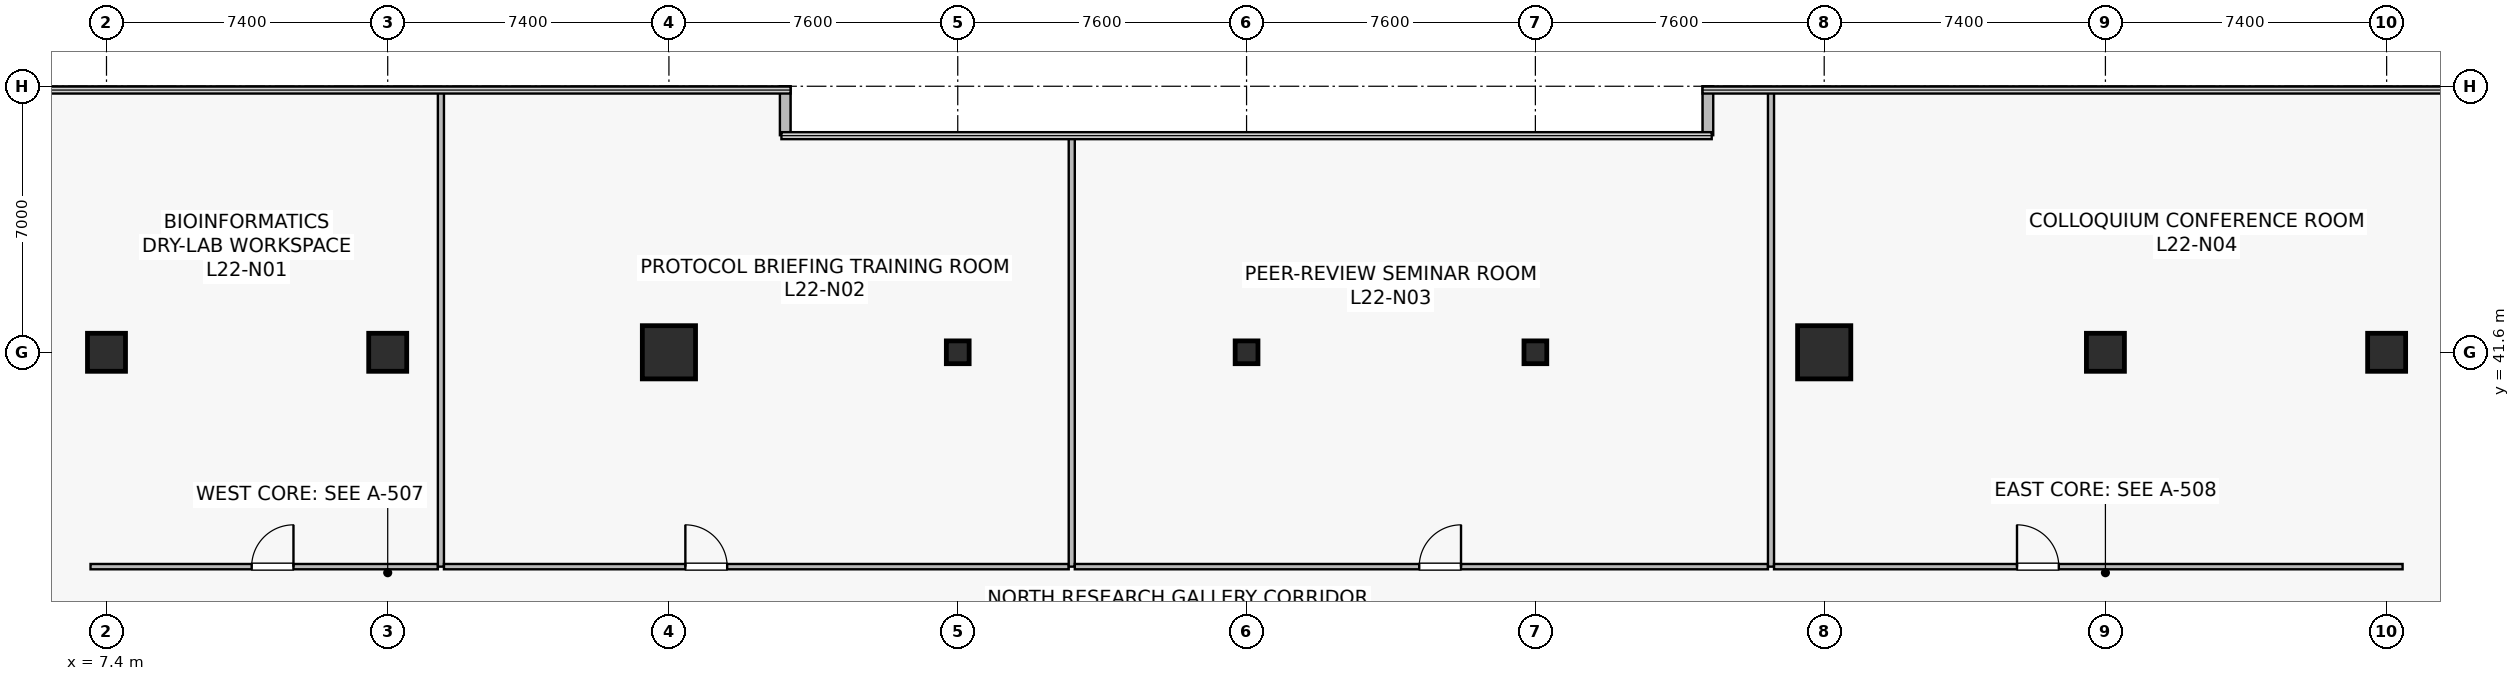
"""IFC4 building model, lengths in metres.
Left out: names, types, materials, properties, quantities, classifications, styles, units other than length and angle.
Written with IfcOpenShell. Run it as: python <this file> out.ifc"""

import sys

from ifc_helpers import new_model, si_unit, direction, frame, frame_2d, origin, origin_2d, place, context, subcontext, project, spatial, rectangle, hollow_rectangle, extrude, source, transform, mapped, element, fill, save


model = new_model("IFC4")
c1 = context("Model", 3, precision=1e-05, world=origin(), true_north=direction((0.0, 1.0)))
c2 = subcontext(c1, "Body", "Model", "MODEL_VIEW")
j1 = project(units=[si_unit("LENGTHUNIT", "METRE"), si_unit("PLANEANGLEUNIT", "RADIAN")], contexts=[c1])
p1 = place(None, origin())
s1 = spatial("IfcSite", under=j1, at=p1, CompositionType="ELEMENT")
p2 = place(p1, origin())
s2 = spatial("IfcBuilding", under=s1, at=p2, CompositionType="ELEMENT")
p3 = place(p2, frame((0.0, 0.0, 90.8)))
s3 = spatial("IfcBuildingStorey", under=s2, at=p3, CompositionType="ELEMENT", Elevation=90.8)
m1 = source(origin(), c2, "Body", "SweptSolid", [
    extrude(rectangle(XDim=1.0, YDim=1.0, at=origin_2d()), origin(), (0.0, 0.0, 1.0), 4.1),
])
p4 = place(p3, frame((14.8, 41.6, 0.0), z_axis=(0.0, 0.0, 1.0), x_axis=(1.0, 0.0, 0.0)))
e1 = element("IfcColumn", 1, at=p4, inside=s3, PredefinedType="COLUMN", context=c2, shape_type="MappedRepresentation", body=[
    mapped(m1, transform((0.0, 0.0, 0.0), scale=1.0)),
])
m2 = source(origin(), c2, "Body", "SweptSolid", [
    extrude(rectangle(XDim=1.4, YDim=1.4, at=origin_2d()), origin(), (0.0, 0.0, 1.0), 4.1),
])
for number, where, z_axis, x_axis in (
    (2, (22.2, 41.6, 0.0), (0.0, 0.0, 1.0), (1.0, 0.0, 0.0)),
    (3, (52.6, 41.6, 0.0), (0.0, 0.0, 1.0), (1.0, 0.0, 0.0)),
):
    element("IfcColumn", number, at=place(p3, frame(where, z_axis=z_axis, x_axis=x_axis)), inside=s3, PredefinedType="COLUMN", context=c2, shape_type="MappedRepresentation", body=[
        mapped(m2, transform((0.0, 0.0, 0.0), scale=1.0)),
    ])
for number, where, z_axis, x_axis in (
    (4, (60.0, 41.6, 0.0), (0.0, 0.0, 1.0), (1.0, 0.0, 0.0)),
    (5, (7.4, 41.6, 0.0), (0.0, 0.0, 1.0), (1.0, 0.0, 0.0)),
    (6, (67.4, 41.6, 0.0), (0.0, 0.0, 1.0), (1.0, 0.0, 0.0)),
):
    element("IfcColumn", number, at=place(p3, frame(where, z_axis=z_axis, x_axis=x_axis)), inside=s3, PredefinedType="COLUMN", context=c2, shape_type="MappedRepresentation", body=[
        mapped(m1, transform((0.0, 0.0, 0.0), scale=1.0)),
    ])
m3 = source(origin(), c2, "Body", "SweptSolid", [
    extrude(hollow_rectangle(XDim=0.6, YDim=0.6, WallThickness=0.028, at=origin_2d()), origin(), (0.0, 0.0, 1.0), 4.1),
])
for number, where, z_axis, x_axis in (
    (7, (29.8, 41.6, 0.0), (0.0, 0.0, 1.0), (1.0, 0.0, 0.0)),
    (8, (37.4, 41.6, 0.0), (0.0, 0.0, 1.0), (1.0, 0.0, 0.0)),
    (9, (45.0, 41.6, 0.0), (0.0, 0.0, 1.0), (1.0, 0.0, 0.0)),
):
    element("IfcColumn", number, at=place(p3, frame(where, z_axis=z_axis, x_axis=x_axis)), inside=s3, PredefinedType="COLUMN", context=c2, shape_type="MappedRepresentation", body=[
        mapped(m3, transform((0.0, 0.0, 0.0), scale=1.0)),
    ])
for number, where, z_axis, x_axis in (
    (10, (49.54, 48.6, 0.0), (0.0, 0.0, 1.0), (0.0, -1.0, 0.0)),
    (11, (25.26, 47.312, 0.0), (0.0, 0.0, 1.0), (0.0, 1.0, 0.0)),
):
    element("IfcWall", number, at=place(p3, frame(where, z_axis=z_axis, x_axis=x_axis)), inside=s3, PredefinedType="STANDARD", context=c2, shape_type="SweptSolid", body=[
        extrude(rectangle(XDim=1.288, YDim=0.28, at=frame_2d((0.644, 0.0))), origin(), (0.0, 0.0, 1.0), 3.78),
    ])
p5 = place(p3, frame((6.98, 35.96, 0.0), z_axis=(0.0, 0.0, 1.0), x_axis=(1.0, 0.0, 0.0)))
e12 = element("IfcWall", 12, at=p5, inside=s3, PredefinedType="PARTITIONING", context=c2, shape_type="SweptSolid", body=[
    extrude(rectangle(XDim=9.14, YDim=0.14, at=frame_2d((4.57, 0.0))), origin(), (0.0, 0.0, 1.0), 3.115),
])
p6 = place(p5, frame((4.24, 0.0, 0.0)))
e13 = element("IfcOpeningElement", 13, at=p6, cuts=e12, PredefinedType="OPENING", context=c2, shape_type="SweptSolid", body=[
    extrude(rectangle(XDim=1.1, YDim=2.18, at=frame_2d((0.55, 1.09))), frame((0.0, 0.08, 0.0), z_axis=(0.0, -1.0, 0.0), x_axis=(1.0, 0.0, 0.0)), (0.0, 0.0, 1.0), 0.16),
])
p7 = place(p3, frame((16.2, 35.96, 0.0), z_axis=(0.0, 0.0, 1.0), x_axis=(0.0, 1.0, 0.0)))
e14 = element("IfcWall", 14, at=p7, inside=s3, PredefinedType="PARTITIONING", context=c2, shape_type="SweptSolid", body=[
    extrude(rectangle(XDim=12.53, YDim=0.16, at=frame_2d((6.265, 0.0))), origin(), (0.0, 0.0, 1.0), 3.015),
])
p8 = place(p3, frame((16.28, 35.96, 0.0), z_axis=(0.0, 0.0, 1.0), x_axis=(1.0, 0.0, 0.0)))
e15 = element("IfcWall", 15, at=p8, inside=s3, PredefinedType="PARTITIONING", context=c2, shape_type="SweptSolid", body=[
    extrude(rectangle(XDim=16.44, YDim=0.14, at=frame_2d((8.22, 0.0))), origin(), (0.0, 0.0, 1.0), 3.115),
])
p9 = place(p8, frame((6.352, 0.0, 0.0)))
e16 = element("IfcOpeningElement", 16, at=p9, cuts=e15, PredefinedType="OPENING", context=c2, shape_type="SweptSolid", body=[
    extrude(rectangle(XDim=1.1, YDim=2.18, at=frame_2d((0.55, 1.09))), frame((0.0, 0.08, 0.0), z_axis=(0.0, -1.0, 0.0), x_axis=(1.0, 0.0, 0.0)), (0.0, 0.0, 1.0), 0.16),
])
p10 = place(p3, frame((32.8, 35.96, 0.0), z_axis=(0.0, 0.0, 1.0), x_axis=(0.0, 1.0, 0.0)))
e17 = element("IfcWall", 17, at=p10, inside=s3, PredefinedType="PARTITIONING", context=c2, shape_type="SweptSolid", body=[
    extrude(rectangle(XDim=11.33, YDim=0.16, at=frame_2d((5.665, 0.0))), origin(), (0.0, 0.0, 1.0), 3.015),
])
p11 = place(p3, frame((32.88, 35.96, 0.0), z_axis=(0.0, 0.0, 1.0), x_axis=(1.0, 0.0, 0.0)))
e18 = element("IfcWall", 18, at=p11, inside=s3, PredefinedType="PARTITIONING", context=c2, shape_type="SweptSolid", body=[
    extrude(rectangle(XDim=18.24, YDim=0.14, at=frame_2d((9.12, 0.0))), origin(), (0.0, 0.0, 1.0), 3.115),
])
p12 = place(p11, frame((9.063, 0.0, 0.0)))
e19 = element("IfcOpeningElement", 19, at=p12, cuts=e18, PredefinedType="OPENING", context=c2, shape_type="SweptSolid", body=[
    extrude(rectangle(XDim=1.1, YDim=2.18, at=frame_2d((0.55, 1.09))), frame((0.0, 0.08, 0.0), z_axis=(0.0, -1.0, 0.0), x_axis=(1.0, 0.0, 0.0)), (0.0, 0.0, 1.0), 0.16),
])
p13 = place(p3, frame((51.2, 35.96, 0.0), z_axis=(0.0, 0.0, 1.0), x_axis=(0.0, 1.0, 0.0)))
e20 = element("IfcWall", 20, at=p13, inside=s3, PredefinedType="PARTITIONING", context=c2, shape_type="SweptSolid", body=[
    extrude(rectangle(XDim=12.53, YDim=0.16, at=frame_2d((6.265, 0.0))), origin(), (0.0, 0.0, 1.0), 3.015),
])
p14 = place(p3, frame((51.28, 35.96, 0.0), z_axis=(0.0, 0.0, 1.0), x_axis=(1.0, 0.0, 0.0)))
e21 = element("IfcWall", 21, at=p14, inside=s3, PredefinedType="PARTITIONING", context=c2, shape_type="SweptSolid", body=[
    extrude(rectangle(XDim=16.54, YDim=0.14, at=frame_2d((8.27, 0.0))), origin(), (0.0, 0.0, 1.0), 3.115),
])
p15 = place(p14, frame((6.393, 0.0, 0.0)))
e22 = element("IfcOpeningElement", 22, at=p15, cuts=e21, PredefinedType="OPENING", context=c2, shape_type="SweptSolid", body=[
    extrude(rectangle(XDim=1.1, YDim=2.18, at=frame_2d((0.55, 1.09))), frame((0.0, 0.08, 0.0), z_axis=(0.0, -1.0, 0.0), x_axis=(1.0, 0.0, 0.0)), (0.0, 0.0, 1.0), 0.16),
])
m4 = source(origin(), c2, "Body", "SweptSolid", [
    extrude(rectangle(XDim=1.1, YDim=2.18, at=frame_2d((0.55, 1.09))), frame((0.0, 0.025, 0.0), z_axis=(0.0, -1.0, 0.0), x_axis=(1.0, 0.0, 0.0)), (0.0, 0.0, 1.0), 0.05),
])
p16 = place(p6, origin())
e23 = element("IfcDoor", 23, at=p16, inside=s3, OperationType="SINGLE_SWING_RIGHT", PredefinedType="DOOR", context=c2, shape_type="MappedRepresentation", body=[
    mapped(m4, transform((0.0, 0.0, 0.0), scale=1.0)),
])
fill(e13, e23)
p17 = place(p9, origin())
e24 = element("IfcDoor", 24, at=p17, inside=s3, OperationType="SINGLE_SWING_LEFT", PredefinedType="DOOR", context=c2, shape_type="MappedRepresentation", body=[
    mapped(m4, transform((0.0, 0.0, 0.0), scale=1.0)),
])
fill(e16, e24)
p18 = place(p12, origin())
e25 = element("IfcDoor", 25, at=p18, inside=s3, OperationType="SINGLE_SWING_RIGHT", PredefinedType="DOOR", context=c2, shape_type="MappedRepresentation", body=[
    mapped(m4, transform((0.0, 0.0, 0.0), scale=1.0)),
])
fill(e19, e25)
p19 = place(p15, origin())
e26 = element("IfcDoor", 26, at=p19, inside=s3, OperationType="SINGLE_SWING_LEFT", PredefinedType="DOOR", context=c2, shape_type="MappedRepresentation", body=[
    mapped(m4, transform((0.0, 0.0, 0.0), scale=1.0)),
])
fill(e22, e26)
save(model, sys.argv[1])
